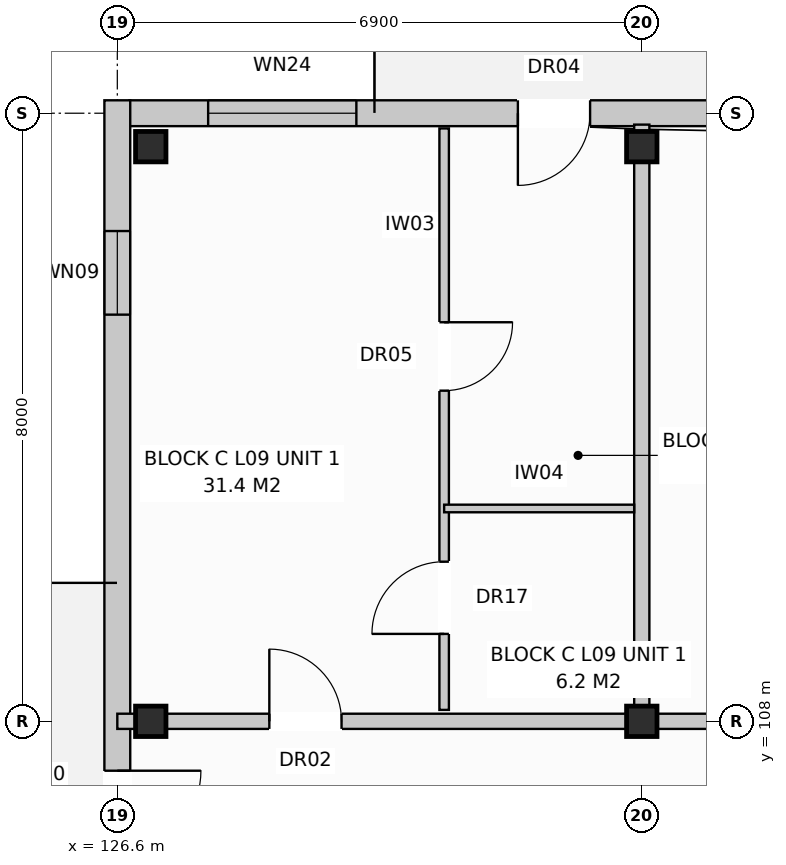
"""IFC4 building model, lengths in metres.
Left out: names, types, materials, properties, quantities, classifications, styles, units other than length and angle.
Written with IfcOpenShell. Run it as: python <this file> out.ifc"""

import sys

from ifc_helpers import new_model, si_unit, direction, frame, frame_2d, origin, origin_with_axes, origin_2d, place, context, subcontext, project, spatial, rectangle, extrude, element, fill, save


model = new_model("IFC4")
c1 = context("Model", 3, precision=1e-05, world=origin(), true_north=direction((0.0, 1.0)))
c2 = subcontext(c1, "Body", "Model", "MODEL_VIEW")
j1 = project(units=[si_unit("LENGTHUNIT", "METRE"), si_unit("PLANEANGLEUNIT", "RADIAN")], contexts=[c1])
p1 = place(None, origin())
s1 = spatial("IfcSite", under=j1, at=p1, CompositionType="ELEMENT")
p2 = place(p1, origin())
s2 = spatial("IfcBuilding", under=s1, at=p2, CompositionType="ELEMENT")
p3 = place(p2, frame((0.0, 0.0, 30.4)))
s3 = spatial("IfcBuildingStorey", under=s2, at=p3, CompositionType="ELEMENT", Elevation=30.4)
for number, where, z_axis, x_axis in (
    (1, (127.04, 108.0, 0.0), (0.0, 0.0, 1.0), (1.0, 0.0, 0.0)),
    (2, (127.04, 115.56, 0.0), (0.0, 0.0, 1.0), (1.0, 0.0, 0.0)),
    (3, (133.5, 108.0, 0.0), (0.0, 0.0, 1.0), (1.0, 0.0, 0.0)),
    (4, (133.5, 115.56, 0.0), (0.0, 0.0, 1.0), (1.0, 0.0, 0.0)),
):
    element("IfcColumn", number, at=place(p3, frame(where, z_axis=z_axis, x_axis=x_axis)), inside=s3, PredefinedType="COLUMN", context=c2, shape_type="SweptSolid", body=[
        extrude(rectangle(XDim=0.4, YDim=0.4, at=origin_2d()), origin(), (0.0, 0.0, 1.0), 3.2),
    ])
p4 = place(p3, frame((126.76, 116.0, 0.0), z_axis=(0.0, 0.0, 1.0), x_axis=(1.0, 0.0, 0.0)))
e5 = element("IfcWall", 5, at=p4, inside=s3, PredefinedType="STANDARD", context=c2, shape_type="SweptSolid", body=[
    extrude(rectangle(XDim=41.08, YDim=0.34, at=frame_2d((20.54, 0.0))), origin(), (0.0, 0.0, 1.0), 2.96),
])
p5 = place(p4, frame((5.11, 0.0, 0.0)))
e6 = element("IfcOpeningElement", 6, at=p5, cuts=e5, PredefinedType="OPENING", context=c2, shape_type="SweptSolid", body=[
    extrude(rectangle(XDim=0.95, YDim=2.1, at=frame_2d((0.475, 1.05))), frame((0.0, 0.182, 0.0), z_axis=(0.0, -1.0, 0.0), x_axis=(1.0, 0.0, 0.0)), (0.0, 0.0, 1.0), 0.364),
])
p6 = place(p4, frame((18.91, 0.0, 0.0)))
e7 = element("IfcOpeningElement", 7, at=p6, cuts=e5, PredefinedType="OPENING", context=c2, shape_type="SweptSolid", body=[
    extrude(rectangle(XDim=0.95, YDim=2.1, at=frame_2d((0.475, 1.05))), frame((0.0, 0.182, 0.0), z_axis=(0.0, -1.0, 0.0), x_axis=(1.0, 0.0, 0.0)), (0.0, 0.0, 1.0), 0.364),
])
p7 = place(p4, frame((31.443, 0.0, 0.0)))
e8 = element("IfcOpeningElement", 8, at=p7, cuts=e5, PredefinedType="OPENING", context=c2, shape_type="SweptSolid", body=[
    extrude(rectangle(XDim=0.95, YDim=2.1, at=frame_2d((0.475, 1.05))), frame((0.0, 0.182, 0.0), z_axis=(0.0, -1.0, 0.0), x_axis=(1.0, 0.0, 0.0)), (0.0, 0.0, 1.0), 0.364),
])
p8 = place(p4, frame((1.035, 0.0, 0.8)))
e9 = element("IfcOpeningElement", 9, at=p8, cuts=e5, PredefinedType="OPENING", context=c2, shape_type="SweptSolid", body=[
    extrude(rectangle(XDim=1.95, YDim=1.65, at=frame_2d((0.975, 0.825))), frame((0.0, 0.182, 0.0), z_axis=(0.0, -1.0, 0.0), x_axis=(1.0, 0.0, 0.0)), (0.0, 0.0, 1.0), 0.364),
])
p9 = place(p4, frame((9.36, 0.0, 0.72)))
e10 = element("IfcOpeningElement", 10, at=p9, cuts=e5, PredefinedType="OPENING", context=c2, shape_type="SweptSolid", body=[
    extrude(rectangle(XDim=1.1, YDim=1.5, at=frame_2d((0.55, 0.75))), frame((0.0, 0.182, 0.0), z_axis=(0.0, -1.0, 0.0), x_axis=(1.0, 0.0, 0.0)), (0.0, 0.0, 1.0), 0.364),
])
p10 = place(p4, frame((14.66, 0.0, 0.8)))
e11 = element("IfcOpeningElement", 11, at=p10, cuts=e5, PredefinedType="OPENING", context=c2, shape_type="SweptSolid", body=[
    extrude(rectangle(XDim=1.9, YDim=1.85, at=frame_2d((0.95, 0.925))), frame((0.0, 0.182, 0.0), z_axis=(0.0, -1.0, 0.0), x_axis=(1.0, 0.0, 0.0)), (0.0, 0.0, 1.0), 0.364),
])
p11 = place(p4, frame((21.46, 0.0, 0.72)))
e12 = element("IfcOpeningElement", 12, at=p11, cuts=e5, PredefinedType="OPENING", context=c2, shape_type="SweptSolid", body=[
    extrude(rectangle(XDim=1.1, YDim=1.5, at=frame_2d((0.55, 0.75))), frame((0.0, 0.182, 0.0), z_axis=(0.0, -1.0, 0.0), x_axis=(1.0, 0.0, 0.0)), (0.0, 0.0, 1.0), 0.364),
])
p12 = place(p4, frame((24.51, 0.0, 0.8)))
e13 = element("IfcOpeningElement", 13, at=p12, cuts=e5, PredefinedType="OPENING", context=c2, shape_type="SweptSolid", body=[
    extrude(rectangle(XDim=1.8, YDim=1.7, at=frame_2d((0.9, 0.85))), frame((0.0, 0.182, 0.0), z_axis=(0.0, -1.0, 0.0), x_axis=(1.0, 0.0, 0.0)), (0.0, 0.0, 1.0), 0.364),
])
p13 = place(p4, frame((29.16, 0.0, 0.8)))
e14 = element("IfcOpeningElement", 14, at=p13, cuts=e5, PredefinedType="OPENING", context=c2, shape_type="SweptSolid", body=[
    extrude(rectangle(XDim=1.9, YDim=1.85, at=frame_2d((0.95, 0.925))), frame((0.0, 0.182, 0.0), z_axis=(0.0, -1.0, 0.0), x_axis=(1.0, 0.0, 0.0)), (0.0, 0.0, 1.0), 0.364),
])
p14 = place(p4, frame((35.26, 0.0, 0.72)))
e15 = element("IfcOpeningElement", 15, at=p14, cuts=e5, PredefinedType="OPENING", context=c2, shape_type="SweptSolid", body=[
    extrude(rectangle(XDim=1.1, YDim=1.5, at=frame_2d((0.55, 0.75))), frame((0.0, 0.182, 0.0), z_axis=(0.0, -1.0, 0.0), x_axis=(1.0, 0.0, 0.0)), (0.0, 0.0, 1.0), 0.364),
])
p15 = place(p4, frame((38.11, 0.0, 0.8)))
e16 = element("IfcOpeningElement", 16, at=p15, cuts=e5, PredefinedType="OPENING", context=c2, shape_type="SweptSolid", body=[
    extrude(rectangle(XDim=1.8, YDim=1.7, at=frame_2d((0.9, 0.85))), frame((0.0, 0.182, 0.0), z_axis=(0.0, -1.0, 0.0), x_axis=(1.0, 0.0, 0.0)), (0.0, 0.0, 1.0), 0.364),
])
p16 = place(p3, frame((126.6, 97.43, 0.0), z_axis=(0.0, 0.0, 1.0), x_axis=(0.0, 1.0, 0.0)))
e17 = element("IfcWall", 17, at=p16, inside=s3, PredefinedType="STANDARD", context=c2, shape_type="SweptSolid", body=[
    extrude(rectangle(XDim=18.74, YDim=0.34, at=frame_2d((9.37, 0.0))), origin(), (0.0, 0.0, 1.0), 2.96),
])
p17 = place(p16, frame((8.82, 0.0, 0.0)))
e18 = element("IfcOpeningElement", 18, at=p17, cuts=e17, PredefinedType="OPENING", context=c2, shape_type="SweptSolid", body=[
    extrude(rectangle(XDim=1.1, YDim=2.1, at=frame_2d((0.55, 1.05))), frame((0.0, 0.182, 0.0), z_axis=(0.0, -1.0, 0.0), x_axis=(1.0, 0.0, 0.0)), (0.0, 0.0, 1.0), 0.364),
])
p18 = place(p16, frame((15.92, 0.0, 0.72)))
e19 = element("IfcOpeningElement", 19, at=p18, cuts=e17, PredefinedType="OPENING", context=c2, shape_type="SweptSolid", body=[
    extrude(rectangle(XDim=1.1, YDim=1.5, at=frame_2d((0.55, 0.75))), frame((0.0, 0.182, 0.0), z_axis=(0.0, -1.0, 0.0), x_axis=(1.0, 0.0, 0.0)), (0.0, 0.0, 1.0), 0.364),
])
p19 = place(p3, frame((133.5, 108.15, 0.0), z_axis=(0.0, 0.0, 1.0), x_axis=(0.0, 1.0, 0.0)))
e20 = element("IfcWall", 20, at=p19, inside=s3, PredefinedType="PARTITIONING", context=c2, shape_type="SweptSolid", body=[
    extrude(rectangle(XDim=7.7, YDim=0.2, at=frame_2d((3.85, 0.0))), origin(), (0.0, 0.0, 1.0), 2.4),
])
p20 = place(p3, frame((126.6, 108.0, 0.0), z_axis=(0.0, 0.0, 1.0), x_axis=(1.0, 0.0, 0.0)))
e21 = element("IfcWall", 21, at=p20, inside=s3, PredefinedType="PARTITIONING", context=c2, shape_type="SweptSolid", body=[
    extrude(rectangle(XDim=6.9, YDim=0.2, at=frame_2d((3.45, 0.0))), origin(), (0.0, 0.0, 1.0), 2.4),
])
p21 = place(p20, frame((2.0, 0.0, 0.0)))
e22 = element("IfcOpeningElement", 22, at=p21, cuts=e21, PredefinedType="OPENING", context=c2, shape_type="SweptSolid", body=[
    extrude(rectangle(XDim=0.95, YDim=2.15, at=frame_2d((0.475, 1.075))), frame((0.0, 0.112, 0.0), z_axis=(0.0, -1.0, 0.0), x_axis=(1.0, 0.0, 0.0)), (0.0, 0.0, 1.0), 0.224),
])
p22 = place(p3, frame((130.9, 108.15, 0.0), z_axis=(0.0, 0.0, 1.0), x_axis=(0.0, 1.0, 0.0)))
e23 = element("IfcWall", 23, at=p22, inside=s3, PredefinedType="PARTITIONING", context=c2, shape_type="SweptSolid", body=[
    extrude(rectangle(XDim=7.65, YDim=0.125, at=frame_2d((3.825, 0.0))), origin(), (0.0, 0.0, 1.0), 2.59),
])
p23 = place(p22, frame((1.0, 0.0, 0.0)))
e24 = element("IfcOpeningElement", 24, at=p23, cuts=e23, PredefinedType="OPENING", context=c2, shape_type="SweptSolid", body=[
    extrude(rectangle(XDim=0.95, YDim=2.1, at=frame_2d((0.475, 1.05))), frame((0.0, 0.074, 0.0), z_axis=(0.0, -1.0, 0.0), x_axis=(1.0, 0.0, 0.0)), (0.0, 0.0, 1.0), 0.149),
])
p24 = place(p22, frame((4.2, 0.0, 0.0)))
e25 = element("IfcOpeningElement", 25, at=p24, cuts=e23, PredefinedType="OPENING", context=c2, shape_type="SweptSolid", body=[
    extrude(rectangle(XDim=0.9, YDim=2.1, at=frame_2d((0.45, 1.05))), frame((0.0, 0.074, 0.0), z_axis=(0.0, -1.0, 0.0), x_axis=(1.0, 0.0, 0.0)), (0.0, 0.0, 1.0), 0.149),
])
p25 = place(p3, frame((130.9, 110.8, 0.0), z_axis=(0.0, 0.0, 1.0), x_axis=(1.0, 0.0, 0.0)))
e26 = element("IfcWall", 26, at=p25, inside=s3, PredefinedType="PARTITIONING", context=c2, shape_type="SweptSolid", body=[
    extrude(rectangle(XDim=2.5, YDim=0.1, at=frame_2d((1.25, 0.0))), origin(), (0.0, 0.0, 1.0), 2.96),
])
p26 = place(p3, frame((133.5, 108.0, 0.0), z_axis=(0.0, 0.0, 1.0), x_axis=(1.0, 0.0, 0.0)))
e27 = element("IfcWall", 27, at=p26, inside=s3, PredefinedType="PARTITIONING", context=c2, shape_type="SweptSolid", body=[
    extrude(rectangle(XDim=20.7, YDim=0.2, at=frame_2d((10.35, 0.0))), origin(), (0.0, 0.0, 1.0), 2.4),
])
p27 = place(p26, frame((2.4, 0.0, 0.0)))
e28 = element("IfcOpeningElement", 28, at=p27, cuts=e27, PredefinedType="OPENING", context=c2, shape_type="SweptSolid", body=[
    extrude(rectangle(XDim=0.95, YDim=2.15, at=frame_2d((0.475, 1.075))), frame((0.0, 0.112, 0.0), z_axis=(0.0, -1.0, 0.0), x_axis=(1.0, 0.0, 0.0)), (0.0, 0.0, 1.0), 0.224),
])
p28 = place(p5, frame((0.95, 0.0, 0.0), z_axis=(0.0, 0.0, 1.0), x_axis=(-1.0, 0.0, 0.0)))
e29 = element("IfcDoor", 29, at=p28, inside=s3, OperationType="SINGLE_SWING_LEFT", PredefinedType="DOOR", context=c2, shape_type="SweptSolid", body=[
    extrude(rectangle(XDim=0.95, YDim=2.1, at=frame_2d((0.475, 1.05))), frame((0.0, 0.025, 0.0), z_axis=(0.0, -1.0, 0.0), x_axis=(1.0, 0.0, 0.0)), (0.0, 0.0, 1.0), 0.05),
])
fill(e6, e29)
p29 = place(p8, origin_with_axes())
e30 = element("IfcWindow", 30, at=p29, inside=s3, PartitioningType="SINGLE_PANEL", PredefinedType="WINDOW", context=c2, shape_type="SweptSolid", body=[
    extrude(rectangle(XDim=1.95, YDim=1.65, at=frame_2d((0.975, 0.825))), frame((0.0, 0.03, 0.0), z_axis=(0.0, -1.0, 0.0), x_axis=(1.0, 0.0, 0.0)), (0.0, 0.0, 1.0), 0.06),
])
fill(e9, e30)
p30 = place(p17, frame((1.1, 0.0, 0.0), z_axis=(0.0, 0.0, 1.0), x_axis=(-1.0, 0.0, 0.0)))
e31 = element("IfcDoor", 31, at=p30, inside=s3, OperationType="SINGLE_SWING_RIGHT", PredefinedType="DOOR", context=c2, shape_type="SweptSolid", body=[
    extrude(rectangle(XDim=1.1, YDim=2.1, at=frame_2d((0.55, 1.05))), frame((0.0, 0.025, 0.0), z_axis=(0.0, -1.0, 0.0), x_axis=(1.0, 0.0, 0.0)), (0.0, 0.0, 1.0), 0.05),
])
fill(e18, e31)
p31 = place(p18, origin_with_axes())
e32 = element("IfcWindow", 32, at=p31, inside=s3, PartitioningType="SINGLE_PANEL", PredefinedType="WINDOW", context=c2, shape_type="SweptSolid", body=[
    extrude(rectangle(XDim=1.1, YDim=1.5, at=frame_2d((0.55, 0.75))), frame((0.0, 0.03, 0.0), z_axis=(0.0, -1.0, 0.0), x_axis=(1.0, 0.0, 0.0)), (0.0, 0.0, 1.0), 0.06),
])
fill(e19, e32)
p32 = place(p21, origin_with_axes())
e33 = element("IfcDoor", 33, at=p32, inside=s3, OperationType="SINGLE_SWING_LEFT", PredefinedType="DOOR", context=c2, shape_type="SweptSolid", body=[
    extrude(rectangle(XDim=0.95, YDim=2.15, at=frame_2d((0.475, 1.075))), frame((0.0, 0.025, 0.0), z_axis=(0.0, -1.0, 0.0), x_axis=(1.0, 0.0, 0.0)), (0.0, 0.0, 1.0), 0.05),
])
fill(e22, e33)
p33 = place(p23, origin_with_axes())
e34 = element("IfcDoor", 34, at=p33, inside=s3, OperationType="SINGLE_SWING_LEFT", PredefinedType="DOOR", context=c2, shape_type="SweptSolid", body=[
    extrude(rectangle(XDim=0.95, YDim=2.1, at=frame_2d((0.475, 1.05))), frame((0.0, 0.025, 0.0), z_axis=(0.0, -1.0, 0.0), x_axis=(1.0, 0.0, 0.0)), (0.0, 0.0, 1.0), 0.05),
])
fill(e24, e34)
p34 = place(p24, frame((0.9, 0.0, 0.0), z_axis=(0.0, 0.0, 1.0), x_axis=(-1.0, 0.0, 0.0)))
e35 = element("IfcDoor", 35, at=p34, inside=s3, OperationType="SINGLE_SWING_RIGHT", PredefinedType="DOOR", context=c2, shape_type="SweptSolid", body=[
    extrude(rectangle(XDim=0.9, YDim=2.1, at=frame_2d((0.45, 1.05))), frame((0.0, 0.025, 0.0), z_axis=(0.0, -1.0, 0.0), x_axis=(1.0, 0.0, 0.0)), (0.0, 0.0, 1.0), 0.05),
])
fill(e25, e35)
save(model, sys.argv[1])
